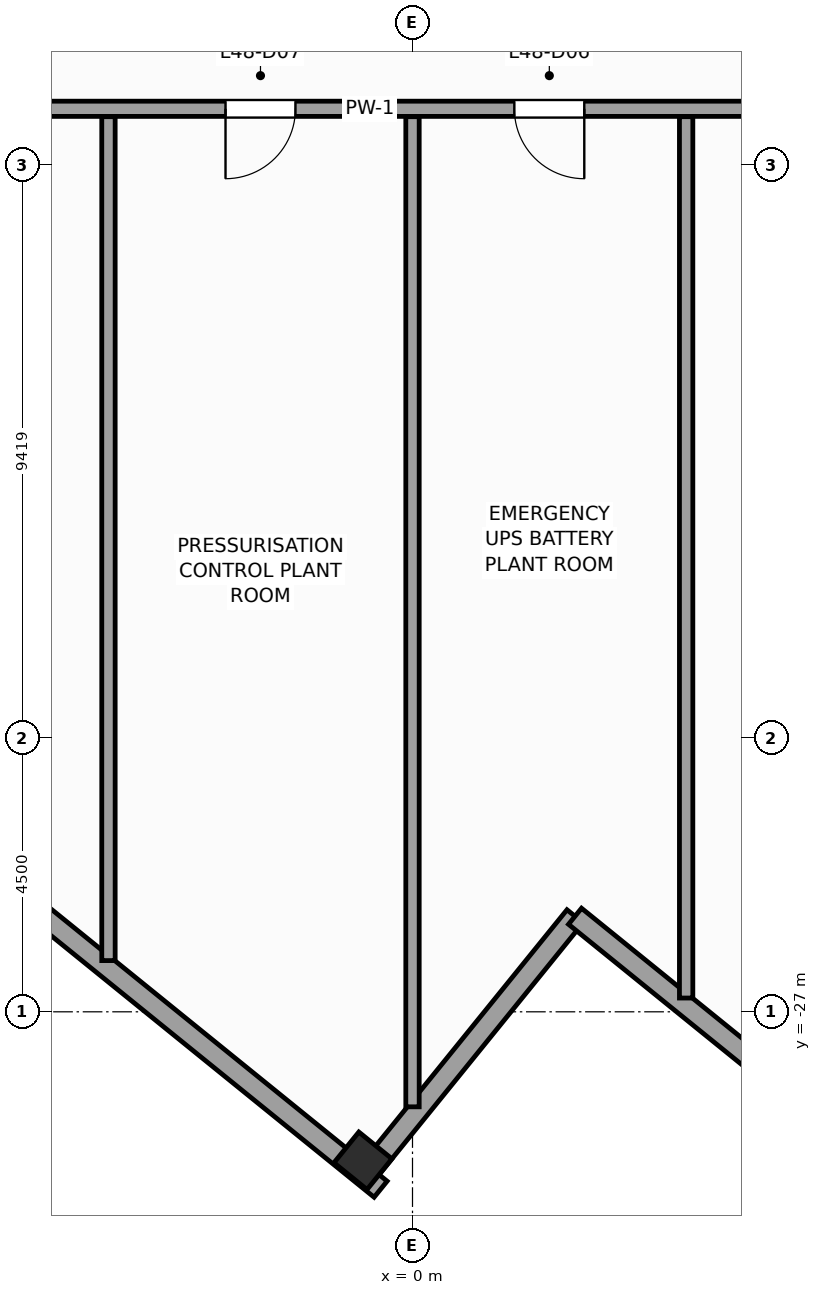
"""IFC4 building model, lengths in metres.
Left out: names, types, materials, properties, quantities, classifications, styles, units other than length and angle.
Written with IfcOpenShell. Run it as: python <this file> out.ifc"""

import sys

from ifc_helpers import new_model, si_unit, direction, frame, frame_2d, origin, origin_2d, place, context, subcontext, project, spatial, rectangle, extrude, source, transform, mapped, element, fill, save


model = new_model("IFC4")
c1 = context("Model", 3, precision=1e-05, world=origin(), true_north=direction((0.0, 1.0)))
c2 = subcontext(c1, "Body", "Model", "MODEL_VIEW")
j1 = project(units=[si_unit("LENGTHUNIT", "METRE"), si_unit("PLANEANGLEUNIT", "RADIAN")], contexts=[c1])
p1 = place(None, origin())
s1 = spatial("IfcSite", under=j1, at=p1, CompositionType="ELEMENT")
p2 = place(p1, origin())
s2 = spatial("IfcBuilding", under=s1, at=p2, CompositionType="ELEMENT")
p3 = place(p2, frame((0.0, 0.0, 200.4)))
s3 = spatial("IfcBuildingStorey", under=s2, at=p3, CompositionType="ELEMENT", Elevation=200.4)
m1 = source(origin(), c2, "Body", "SweptSolid", [
    extrude(rectangle(XDim=0.65, YDim=0.7, at=origin_2d()), origin(), (0.0, 0.0, 1.0), 5.2),
])
p4 = place(p3, frame((-0.815, -29.45, 0.0), z_axis=(0.0, 0.0, 1.0), x_axis=(0.62932039105, 0.777145961457, 0.0)))
e1 = element("IfcColumn", 1, at=p4, inside=s3, PredefinedType="COLUMN", context=c2, shape_type="MappedRepresentation", body=[
    mapped(m1, transform((0.0, 0.0, 0.0), scale=1.0)),
])
p5 = place(p3, frame((-0.789, -29.703, 0.0), z_axis=(0.0, 0.0, 1.0), x_axis=(0.629323365087, 0.77714355312, 0.0)))
e2 = element("IfcWall", 2, at=p5, inside=s3, PredefinedType="STANDARD", context=c2, shape_type="SweptSolid", body=[
    extrude(rectangle(XDim=5.5, YDim=0.34, at=frame_2d((2.75, 0.0))), origin(), (0.0, 0.0, 1.0), 4.96),
])
p6 = place(p3, frame((2.673, -25.429, 0.0), z_axis=(0.0, 0.0, 1.0), x_axis=(0.777162640055, -0.629299794138, 0.0)))
e3 = element("IfcWall", 3, at=p6, inside=s3, PredefinedType="STANDARD", context=c2, shape_type="SweptSolid", body=[
    extrude(rectangle(XDim=5.67, YDim=0.34, at=frame_2d((2.835, 0.0))), origin(), (0.0, 0.0, 1.0), 4.96),
])
p7 = place(p3, frame((-14.839, -18.325, 0.0), z_axis=(0.0, 0.0, 1.0), x_axis=(0.777145164153, -0.629321375637, 0.0)))
e4 = element("IfcWall", 4, at=p7, inside=s3, PredefinedType="STANDARD", context=c2, shape_type="SweptSolid", body=[
    extrude(rectangle(XDim=18.42, YDim=0.34, at=frame_2d((9.21, 0.0))), origin(), (0.0, 0.0, 1.0), 4.26),
])
p8 = place(p7, frame((7.289, 0.0, 0.65)))
e5 = element("IfcOpeningElement", 5, at=p8, cuts=e4, PredefinedType="OPENING", context=c2, shape_type="SweptSolid", body=[
    extrude(rectangle(XDim=2.0, YDim=1.45, at=frame_2d((1.0, 0.725))), frame((0.0, 0.18, 0.0), z_axis=(0.0, -1.0, 0.0), x_axis=(1.0, 0.0, 0.0)), (0.0, 0.0, 1.0), 0.36),
])
p9 = place(p3, frame((-12.15, -12.15, 0.0), z_axis=(0.0, 0.0, 1.0), x_axis=(1.0, 0.0, 0.0)))
e6 = element("IfcWall", 6, at=p9, inside=s3, PredefinedType="PARTITIONING", context=c2, shape_type="SweptSolid", body=[
    extrude(rectangle(XDim=22.9, YDim=0.25, at=frame_2d((11.45, 0.0))), origin(), (0.0, 0.0, 1.0), 4.96),
])
p10 = place(p9, frame((19.036, 0.0, 0.0)))
e7 = element("IfcOpeningElement", 7, at=p10, cuts=e6, PredefinedType="OPENING", context=c2, shape_type="SweptSolid", body=[
    extrude(rectangle(XDim=1.15, YDim=2.25, at=frame_2d((0.575, 1.125))), frame((0.0, 0.135, 0.0), z_axis=(0.0, -1.0, 0.0), x_axis=(1.0, 0.0, 0.0)), (0.0, 0.0, 1.0), 0.27),
])
p11 = place(p9, frame((13.825, 0.0, 0.0)))
e8 = element("IfcOpeningElement", 8, at=p11, cuts=e6, PredefinedType="OPENING", context=c2, shape_type="SweptSolid", body=[
    extrude(rectangle(XDim=1.15, YDim=2.25, at=frame_2d((0.575, 1.125))), frame((0.0, 0.135, 0.0), z_axis=(0.0, -1.0, 0.0), x_axis=(1.0, 0.0, 0.0)), (0.0, 0.0, 1.0), 0.27),
])
p12 = place(p9, frame((9.075, 0.0, 0.0)))
e9 = element("IfcOpeningElement", 9, at=p12, cuts=e6, PredefinedType="OPENING", context=c2, shape_type="SweptSolid", body=[
    extrude(rectangle(XDim=1.15, YDim=2.25, at=frame_2d((0.575, 1.125))), frame((0.0, 0.135, 0.0), z_axis=(0.0, -1.0, 0.0), x_axis=(1.0, 0.0, 0.0)), (0.0, 0.0, 1.0), 0.27),
])
p13 = place(p9, frame((3.165, 0.0, 0.0)))
e10 = element("IfcOpeningElement", 10, at=p13, cuts=e6, PredefinedType="OPENING", context=c2, shape_type="SweptSolid", body=[
    extrude(rectangle(XDim=1.15, YDim=2.25, at=frame_2d((0.575, 1.125))), frame((0.0, 0.135, 0.0), z_axis=(0.0, -1.0, 0.0), x_axis=(1.0, 0.0, 0.0)), (0.0, 0.0, 1.0), 0.27),
])
p14 = place(p3, frame((4.5, -12.28, 0.0), z_axis=(0.0, 0.0, 1.0), x_axis=(0.0, -1.0, 0.0)))
e11 = element("IfcWall", 11, at=p14, inside=s3, PredefinedType="PARTITIONING", context=c2, shape_type="SweptSolid", body=[
    extrude(rectangle(XDim=14.493, YDim=0.22, at=frame_2d((7.247, 0.0))), origin(), (0.0, 0.0, 1.0), 4.96),
])
p15 = place(p3, frame((0.0, -12.28, 0.0), z_axis=(0.0, 0.0, 1.0), x_axis=(0.0, -1.0, 0.0)))
e12 = element("IfcWall", 12, at=p15, inside=s3, PredefinedType="PARTITIONING", context=c2, shape_type="SweptSolid", body=[
    extrude(rectangle(XDim=16.282, YDim=0.22, at=frame_2d((8.141, 0.0))), origin(), (0.0, 0.0, 1.0), 4.96),
])
p16 = place(p3, frame((-5.0, -12.28, 0.0), z_axis=(0.0, 0.0, 1.0), x_axis=(0.0, -1.0, 0.0)))
e13 = element("IfcWall", 13, at=p16, inside=s3, PredefinedType="PARTITIONING", context=c2, shape_type="SweptSolid", body=[
    extrude(rectangle(XDim=13.878, YDim=0.22, at=frame_2d((6.939, 0.0))), origin(), (0.0, 0.0, 1.0), 4.96),
])
m2 = source(origin(), c2, "Body", "SweptSolid", [
    extrude(rectangle(XDim=1.15, YDim=2.25, at=frame_2d((0.575, 1.125))), frame((0.0, 0.025, 0.0), z_axis=(0.0, -1.0, 0.0), x_axis=(1.0, 0.0, 0.0)), (0.0, 0.0, 1.0), 0.05),
])
p17 = place(p11, frame((1.15, 0.0, 0.0), z_axis=(0.0, 0.0, 1.0), x_axis=(-1.0, 0.0, 0.0)))
e14 = element("IfcDoor", 14, at=p17, inside=s3, OperationType="SINGLE_SWING_RIGHT", PredefinedType="DOOR", context=c2, shape_type="MappedRepresentation", body=[
    mapped(m2, transform((0.0, 0.0, 0.0), scale=1.0)),
])
fill(e8, e14)
p18 = place(p12, frame((1.15, 0.0, 0.0), z_axis=(0.0, 0.0, 1.0), x_axis=(-1.0, 0.0, 0.0)))
e15 = element("IfcDoor", 15, at=p18, inside=s3, OperationType="SINGLE_SWING_LEFT", PredefinedType="DOOR", context=c2, shape_type="MappedRepresentation", body=[
    mapped(m2, transform((0.0, 0.0, 0.0), scale=1.0)),
])
fill(e9, e15)
save(model, sys.argv[1])
